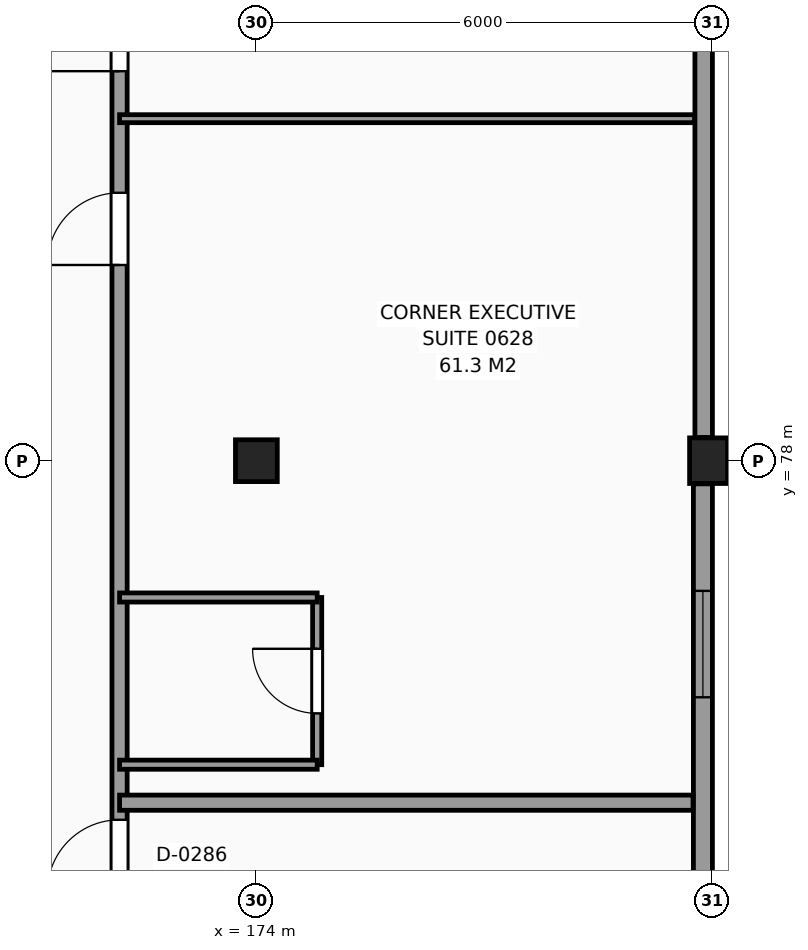
"""IFC4 building model, lengths in metres.
Left out: names, types, materials, properties, quantities, classifications, styles, units other than length and angle.
Written with IfcOpenShell. Run it as: python <this file> out.ifc"""

import sys

from ifc_helpers import new_model, si_unit, direction, frame, frame_2d, origin, origin_2d, place, context, subcontext, project, spatial, rectangle, extrude, element, fill, save


model = new_model("IFC4")
c1 = context("Model", 3, precision=1e-05, world=origin(), true_north=direction((0.0, 1.0)))
c2 = subcontext(c1, "Body", "Model", "MODEL_VIEW")
j1 = project(units=[si_unit("LENGTHUNIT", "METRE"), si_unit("PLANEANGLEUNIT", "RADIAN")], contexts=[c1])
p1 = place(None, origin())
s1 = spatial("IfcSite", under=j1, at=p1, CompositionType="ELEMENT")
p2 = place(p1, origin())
s2 = spatial("IfcBuilding", under=s1, at=p2, CompositionType="ELEMENT")
p3 = place(p2, frame((0.0, 0.0, 28.2)))
s3 = spatial("IfcBuildingStorey", under=s2, at=p3, CompositionType="ELEMENT", Elevation=28.2)
p4 = place(p3, frame((174.0, 78.0, 0.0), z_axis=(0.0, 0.0, 1.0), x_axis=(1.0, 0.0, 0.0)))
e1 = element("IfcColumn", 1, at=p4, inside=s3, PredefinedType="COLUMN", context=c2, shape_type="SweptSolid", body=[
    extrude(rectangle(XDim=0.55, YDim=0.55, at=origin_2d()), origin(), (0.0, 0.0, 1.0), 3.3),
])
p5 = place(p3, frame((180.0, 78.0, 0.0), z_axis=(0.0, 0.0, 1.0), x_axis=(1.0, 0.0, 0.0)))
e2 = element("IfcColumn", 2, at=p5, inside=s3, PredefinedType="COLUMN", context=c2, shape_type="SweptSolid", body=[
    extrude(rectangle(XDim=0.6, YDim=0.6, at=origin_2d()), origin(), (0.0, 0.0, 1.0), 3.3),
])
p6 = place(p3, frame((179.875, 72.305, 0.0), z_axis=(0.0, 0.0, 1.0), x_axis=(0.0, 1.0, 0.0)))
e3 = element("IfcWall", 3, at=p6, inside=s3, PredefinedType="SOLIDWALL", context=c2, shape_type="SweptSolid", body=[
    extrude(rectangle(XDim=5.39, YDim=0.25, at=frame_2d((2.695, 0.0))), origin(), (0.0, 0.0, 1.0), 2.43),
])
p7 = place(p6, frame((2.582, 0.0, 0.8)))
e4 = element("IfcOpeningElement", 4, at=p7, cuts=e3, PredefinedType="OPENING", context=c2, shape_type="SweptSolid", body=[
    extrude(rectangle(XDim=1.4, YDim=1.4, at=frame_2d((0.7, 0.7))), frame((0.0, 0.135, 0.0), z_axis=(0.0, -1.0, 0.0), x_axis=(1.0, 0.0, 0.0)), (0.0, 0.0, 1.0), 0.27),
])
p8 = place(p3, frame((179.885, 78.305, 0.0), z_axis=(0.0, 0.0, 1.0), x_axis=(0.0, 1.0, 0.0)))
e5 = element("IfcWall", 5, at=p8, inside=s3, PredefinedType="SOLIDWALL", context=c2, shape_type="SweptSolid", body=[
    extrude(rectangle(XDim=5.39, YDim=0.23, at=frame_2d((2.695, 0.0))), origin(), (0.0, 0.0, 1.0), 2.43),
])
p9 = place(p3, frame((172.2, 42.275, 0.0), z_axis=(0.0, 0.0, 1.0), x_axis=(0.0, 1.0, 0.0)))
e6 = element("IfcWall", 6, at=p9, inside=s3, PredefinedType="PARTITIONING", context=c2, shape_type="SweptSolid", body=[
    extrude(rectangle(XDim=65.545, YDim=0.2, at=frame_2d((32.772, 0.0))), origin(), (0.0, 0.0, 1.0), 3.08),
])
p10 = place(p9, frame((0.4, 0.0, 0.0)))
e7 = element("IfcOpeningElement", 7, at=p10, cuts=e6, PredefinedType="OPENING", context=c2, shape_type="SweptSolid", body=[
    extrude(rectangle(XDim=0.95, YDim=2.1, at=frame_2d((0.475, 1.05))), frame((0.0, 0.11, 0.0), z_axis=(0.0, -1.0, 0.0), x_axis=(1.0, 0.0, 0.0)), (0.0, 0.0, 1.0), 0.22),
])
p11 = place(p9, frame((4.85, 0.0, 0.0)))
e8 = element("IfcOpeningElement", 8, at=p11, cuts=e6, PredefinedType="OPENING", context=c2, shape_type="SweptSolid", body=[
    extrude(rectangle(XDim=0.95, YDim=2.1, at=frame_2d((0.475, 1.05))), frame((0.0, 0.11, 0.0), z_axis=(0.0, -1.0, 0.0), x_axis=(1.0, 0.0, 0.0)), (0.0, 0.0, 1.0), 0.22),
])
p12 = place(p9, frame((9.35, 0.0, 0.0)))
e9 = element("IfcOpeningElement", 9, at=p12, cuts=e6, PredefinedType="OPENING", context=c2, shape_type="SweptSolid", body=[
    extrude(rectangle(XDim=0.95, YDim=2.1, at=frame_2d((0.475, 1.05))), frame((0.0, 0.11, 0.0), z_axis=(0.0, -1.0, 0.0), x_axis=(1.0, 0.0, 0.0)), (0.0, 0.0, 1.0), 0.22),
])
p13 = place(p9, frame((18.45, 0.0, 0.0)))
e10 = element("IfcOpeningElement", 10, at=p13, cuts=e6, PredefinedType="OPENING", context=c2, shape_type="SweptSolid", body=[
    extrude(rectangle(XDim=0.95, YDim=2.1, at=frame_2d((0.475, 1.05))), frame((0.0, 0.11, 0.0), z_axis=(0.0, -1.0, 0.0), x_axis=(1.0, 0.0, 0.0)), (0.0, 0.0, 1.0), 0.22),
])
p14 = place(p9, frame((22.85, 0.0, 0.0)))
e11 = element("IfcOpeningElement", 11, at=p14, cuts=e6, PredefinedType="OPENING", context=c2, shape_type="SweptSolid", body=[
    extrude(rectangle(XDim=0.95, YDim=2.1, at=frame_2d((0.475, 1.05))), frame((0.0, 0.11, 0.0), z_axis=(0.0, -1.0, 0.0), x_axis=(1.0, 0.0, 0.0)), (0.0, 0.0, 1.0), 0.22),
])
p15 = place(p9, frame((30.05, 0.0, 0.0)))
e12 = element("IfcOpeningElement", 12, at=p15, cuts=e6, PredefinedType="OPENING", context=c2, shape_type="SweptSolid", body=[
    extrude(rectangle(XDim=0.95, YDim=2.1, at=frame_2d((0.475, 1.05))), frame((0.0, 0.11, 0.0), z_axis=(0.0, -1.0, 0.0), x_axis=(1.0, 0.0, 0.0)), (0.0, 0.0, 1.0), 0.22),
])
p16 = place(p9, frame((38.3, 0.0, 0.0)))
e13 = element("IfcOpeningElement", 13, at=p16, cuts=e6, PredefinedType="OPENING", context=c2, shape_type="SweptSolid", body=[
    extrude(rectangle(XDim=0.95, YDim=2.1, at=frame_2d((0.475, 1.05))), frame((0.0, 0.11, 0.0), z_axis=(0.0, -1.0, 0.0), x_axis=(1.0, 0.0, 0.0)), (0.0, 0.0, 1.0), 0.22),
])
p17 = place(p9, frame((40.85, 0.0, 0.0)))
e14 = element("IfcOpeningElement", 14, at=p17, cuts=e6, PredefinedType="OPENING", context=c2, shape_type="SweptSolid", body=[
    extrude(rectangle(XDim=0.95, YDim=2.1, at=frame_2d((0.475, 1.05))), frame((0.0, 0.11, 0.0), z_axis=(0.0, -1.0, 0.0), x_axis=(1.0, 0.0, 0.0)), (0.0, 0.0, 1.0), 0.22),
])
p18 = place(p9, frame((48.05, 0.0, 0.0)))
e15 = element("IfcOpeningElement", 15, at=p18, cuts=e6, PredefinedType="OPENING", context=c2, shape_type="SweptSolid", body=[
    extrude(rectangle(XDim=0.95, YDim=2.1, at=frame_2d((0.475, 1.05))), frame((0.0, 0.11, 0.0), z_axis=(0.0, -1.0, 0.0), x_axis=(1.0, 0.0, 0.0)), (0.0, 0.0, 1.0), 0.22),
])
p19 = place(p9, frame((52.25, 0.0, 0.0)))
e16 = element("IfcOpeningElement", 16, at=p19, cuts=e6, PredefinedType="OPENING", context=c2, shape_type="SweptSolid", body=[
    extrude(rectangle(XDim=0.95, YDim=2.1, at=frame_2d((0.475, 1.05))), frame((0.0, 0.11, 0.0), z_axis=(0.0, -1.0, 0.0), x_axis=(1.0, 0.0, 0.0)), (0.0, 0.0, 1.0), 0.22),
])
p20 = place(p9, frame((54.45, 0.0, 0.0)))
e17 = element("IfcOpeningElement", 17, at=p20, cuts=e6, PredefinedType="OPENING", context=c2, shape_type="SweptSolid", body=[
    extrude(rectangle(XDim=0.95, YDim=2.1, at=frame_2d((0.475, 1.05))), frame((0.0, 0.11, 0.0), z_axis=(0.0, -1.0, 0.0), x_axis=(1.0, 0.0, 0.0)), (0.0, 0.0, 1.0), 0.22),
])
p21 = place(p9, frame((60.45, 0.0, 0.0)))
e18 = element("IfcOpeningElement", 18, at=p21, cuts=e6, PredefinedType="OPENING", context=c2, shape_type="SweptSolid", body=[
    extrude(rectangle(XDim=0.95, YDim=2.1, at=frame_2d((0.475, 1.05))), frame((0.0, 0.11, 0.0), z_axis=(0.0, -1.0, 0.0), x_axis=(1.0, 0.0, 0.0)), (0.0, 0.0, 1.0), 0.22),
])
p22 = place(p3, frame((174.8, 74.0, 0.0), z_axis=(0.0, 0.0, 1.0), x_axis=(0.0, 1.0, 0.0)))
e19 = element("IfcWall", 19, at=p22, inside=s3, PredefinedType="PARTITIONING", context=c2, shape_type="SweptSolid", body=[
    extrude(rectangle(XDim=2.2, YDim=0.12, at=frame_2d((1.1, 0.0))), origin(), (0.0, 0.0, 1.0), 3.08),
])
p23 = place(p22, frame((0.675, 0.0, 0.0)))
e20 = element("IfcOpeningElement", 20, at=p23, cuts=e19, PredefinedType="OPENING", context=c2, shape_type="SweptSolid", body=[
    extrude(rectangle(XDim=0.85, YDim=2.1, at=frame_2d((0.425, 1.05))), frame((0.0, 0.07, 0.0), z_axis=(0.0, -1.0, 0.0), x_axis=(1.0, 0.0, 0.0)), (0.0, 0.0, 1.0), 0.14),
])
p24 = place(p3, frame((172.2, 73.5, 0.0), z_axis=(0.0, 0.0, 1.0), x_axis=(1.0, 0.0, 0.0)))
e21 = element("IfcWall", 21, at=p24, inside=s3, PredefinedType="PARTITIONING", context=c2, shape_type="SweptSolid", body=[
    extrude(rectangle(XDim=7.545, YDim=0.2, at=frame_2d((3.772, 0.0))), origin(), (0.0, 0.0, 1.0), 3.08),
])
for number, where, z_axis, x_axis in (
    (22, (172.2, 74.0, 0.0), (0.0, 0.0, 1.0), (1.0, 0.0, 0.0)),
    (23, (172.2, 76.2, 0.0), (0.0, 0.0, 1.0), (1.0, 0.0, 0.0)),
):
    element("IfcWall", number, at=place(p3, frame(where, z_axis=z_axis, x_axis=x_axis)), inside=s3, PredefinedType="PARTITIONING", context=c2, shape_type="SweptSolid", body=[
        extrude(rectangle(XDim=2.6, YDim=0.12, at=frame_2d((1.3, 0.0))), origin(), (0.0, 0.0, 1.0), 3.08),
    ])
p25 = place(p3, frame((172.2, 82.5, 0.0), z_axis=(0.0, 0.0, 1.0), x_axis=(1.0, 0.0, 0.0)))
e24 = element("IfcWall", 24, at=p25, inside=s3, PredefinedType="PARTITIONING", context=c2, shape_type="SweptSolid", body=[
    extrude(rectangle(XDim=7.565, YDim=0.105, at=frame_2d((3.782, 0.0))), origin(), (0.0, 0.0, 1.0), 3.08),
])
p26 = place(p7, origin())
e25 = element("IfcWindow", 25, at=p26, inside=s3, PartitioningType="SINGLE_PANEL", PredefinedType="WINDOW", context=c2, shape_type="SweptSolid", body=[
    extrude(rectangle(XDim=1.4, YDim=1.4, at=frame_2d((0.7, 0.7))), frame((0.0, 0.03, 0.0), z_axis=(0.0, -1.0, 0.0), x_axis=(1.0, 0.0, 0.0)), (0.0, 0.0, 1.0), 0.06),
])
fill(e4, e25)
p27 = place(p15, origin())
e26 = element("IfcDoor", 26, at=p27, inside=s3, OperationType="SINGLE_SWING_LEFT", PredefinedType="DOOR", context=c2, shape_type="SweptSolid", body=[
    extrude(rectangle(XDim=0.95, YDim=2.1, at=frame_2d((0.475, 1.05))), frame((0.0, 0.025, 0.0), z_axis=(0.0, -1.0, 0.0), x_axis=(1.0, 0.0, 0.0)), (0.0, 0.0, 1.0), 0.05),
])
fill(e12, e26)
p28 = place(p23, origin())
e27 = element("IfcDoor", 27, at=p28, inside=s3, OperationType="SINGLE_SWING_RIGHT", PredefinedType="DOOR", context=c2, shape_type="SweptSolid", body=[
    extrude(rectangle(XDim=0.85, YDim=2.1, at=frame_2d((0.425, 1.05))), frame((0.0, 0.025, 0.0), z_axis=(0.0, -1.0, 0.0), x_axis=(1.0, 0.0, 0.0)), (0.0, 0.0, 1.0), 0.05),
])
fill(e20, e27)
p29 = place(p16, origin())
e28 = element("IfcDoor", 28, at=p29, inside=s3, OperationType="SINGLE_SWING_LEFT", PredefinedType="DOOR", context=c2, shape_type="SweptSolid", body=[
    extrude(rectangle(XDim=0.95, YDim=2.1, at=frame_2d((0.475, 1.05))), frame((0.0, 0.025, 0.0), z_axis=(0.0, -1.0, 0.0), x_axis=(1.0, 0.0, 0.0)), (0.0, 0.0, 1.0), 0.05),
])
fill(e13, e28)
p30 = place(p17, origin())
e29 = element("IfcDoor", 29, at=p30, inside=s3, OperationType="SINGLE_SWING_LEFT", PredefinedType="DOOR", context=c2, shape_type="SweptSolid", body=[
    extrude(rectangle(XDim=0.95, YDim=2.1, at=frame_2d((0.475, 1.05))), frame((0.0, 0.025, 0.0), z_axis=(0.0, -1.0, 0.0), x_axis=(1.0, 0.0, 0.0)), (0.0, 0.0, 1.0), 0.05),
])
fill(e14, e29)
save(model, sys.argv[1])
